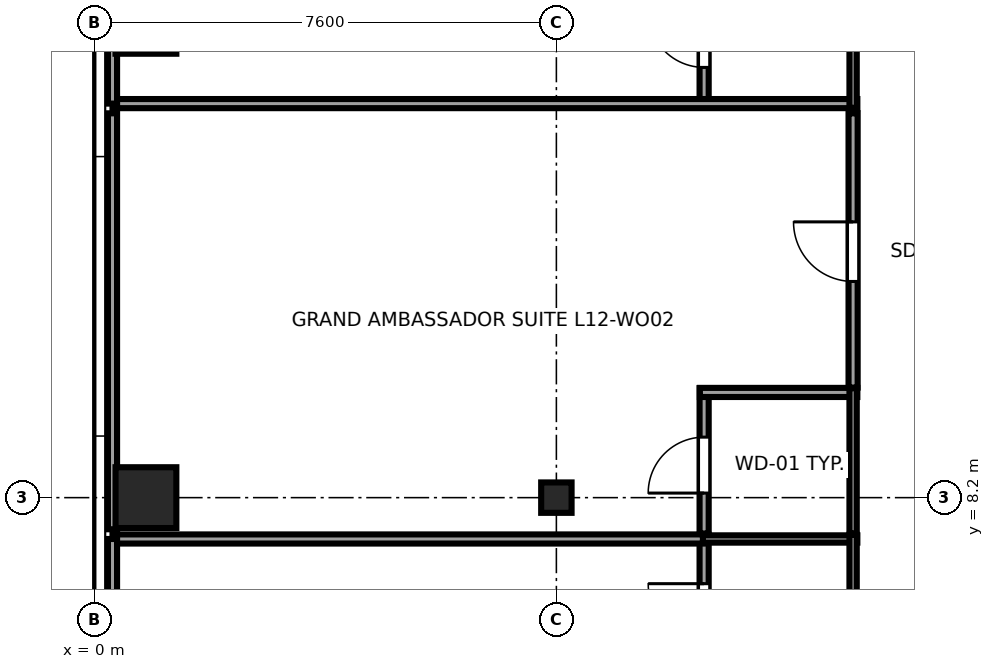
"""IFC4 building model, lengths in metres.
Left out: names, types, materials, properties, quantities, classifications, styles, units other than length and angle.
Written with IfcOpenShell. Run it as: python <this file> out.ifc"""

import sys

from ifc_helpers import new_model, si_unit, direction, frame, frame_2d, origin, origin_2d, place, context, subcontext, project, spatial, rectangle, i_section, extrude, source, transform, mapped, element, fill, save


model = new_model("IFC4")
c1 = context("Model", 3, precision=1e-05, world=origin(), true_north=direction((0.0, 1.0)))
c2 = subcontext(c1, "Body", "Model", "MODEL_VIEW")
j1 = project(units=[si_unit("LENGTHUNIT", "METRE"), si_unit("PLANEANGLEUNIT", "RADIAN")], contexts=[c1])
p1 = place(None, origin())
s1 = spatial("IfcSite", under=j1, at=p1, CompositionType="ELEMENT")
p2 = place(p1, origin())
s2 = spatial("IfcBuilding", under=s1, at=p2, CompositionType="ELEMENT")
p3 = place(p2, frame((0.0, 0.0, 53.3)))
s3 = spatial("IfcBuildingStorey", under=s2, at=p3, CompositionType="ELEMENT", Elevation=53.3)
m1 = source(origin(), c2, "Body", "SweptSolid", [
    extrude(rectangle(XDim=1.0, YDim=1.0, at=origin_2d()), origin(), (0.0, 0.0, 1.0), 3.55),
])
for number, where, z_axis, x_axis in (
    (1, (0.85, 8.2, 0.0), (0.0, 0.0, 1.0), (1.0, 0.0, 0.0)),
    (2, (0.85, 16.0, 0.0), (0.0, 0.0, 1.0), (1.0, 0.0, 0.0)),
):
    element("IfcColumn", number, at=place(p3, frame(where, z_axis=z_axis, x_axis=x_axis)), inside=s3, PredefinedType="COLUMN", context=c2, shape_type="MappedRepresentation", body=[
        mapped(m1, transform((0.0, 0.0, 0.0), x_axis=(1.0, 0.0, 0.0), y_axis=(0.0, 1.0, 0.0), z_axis=(0.0, 0.0, 1.0), scale=1.0)),
    ])
m2 = source(origin(), c2, "Body", "SweptSolid", [
    extrude(i_section(OverallWidth=0.5, OverallDepth=0.5, WebThickness=0.028, FlangeThickness=0.045, at=origin_2d()), origin(), (0.0, 0.0, 1.0), 3.55),
])
p4 = place(p3, frame((7.6, 8.2, 0.0), z_axis=(0.0, 0.0, 1.0), x_axis=(1.0, 0.0, 0.0)))
e3 = element("IfcColumn", 3, at=p4, inside=s3, PredefinedType="COLUMN", context=c2, shape_type="MappedRepresentation", body=[
    mapped(m2, transform((0.0, 0.0, 0.0), x_axis=(1.0, 0.0, 0.0), y_axis=(0.0, 1.0, 0.0), z_axis=(0.0, 0.0, 1.0), scale=1.0)),
])
p5 = place(p3, frame((10.03, 5.2, 0.0), z_axis=(0.0, 0.0, 1.0), x_axis=(0.0, 1.0, 0.0)))
e4 = element("IfcWall", 4, at=p5, inside=s3, PredefinedType="PARTITIONING", context=c2, shape_type="SweptSolid", body=[
    extrude(rectangle(XDim=2.39, YDim=0.15, at=frame_2d((1.195, 0.0))), origin(), (0.0, 0.0, 1.0), 3.37),
])
p6 = place(p5, frame((0.665, 0.0, 0.0)))
e5 = element("IfcOpeningElement", 5, at=p6, cuts=e4, PredefinedType="OPENING", context=c2, shape_type="SweptSolid", body=[
    extrude(rectangle(XDim=0.92, YDim=2.01, at=frame_2d((0.46, 1.005))), frame((0.0, 0.085, 0.0), z_axis=(0.0, -1.0, 0.0), x_axis=(1.0, 0.0, 0.0)), (0.0, 0.0, 1.0), 0.17),
])
p7 = place(p3, frame((9.96, 7.52, 0.0), z_axis=(0.0, 0.0, 1.0), x_axis=(1.0, 0.0, 0.0)))
e6 = element("IfcWall", 6, at=p7, inside=s3, PredefinedType="PLUMBINGWALL", context=c2, shape_type="SweptSolid", body=[
    extrude(rectangle(XDim=2.59, YDim=0.12, at=frame_2d((1.295, 0.0))), origin(), (0.0, 0.0, 1.0), 3.37),
])
p8 = place(p3, frame((12.48, 5.2, 0.0), z_axis=(0.0, 0.0, 1.0), x_axis=(0.0, 1.0, 0.0)))
e7 = element("IfcWall", 7, at=p8, inside=s3, PredefinedType="PLUMBINGWALL", context=c2, shape_type="SweptSolid", body=[
    extrude(rectangle(XDim=2.39, YDim=0.12, at=frame_2d((1.195, 0.0))), origin(), (0.0, 0.0, 1.0), 3.37),
])
p9 = place(p3, frame((10.03, 7.61, 0.0), z_axis=(0.0, 0.0, 1.0), x_axis=(0.0, 1.0, 0.0)))
e8 = element("IfcWall", 8, at=p9, inside=s3, PredefinedType="PARTITIONING", context=c2, shape_type="SweptSolid", body=[
    extrude(rectangle(XDim=2.39, YDim=0.15, at=frame_2d((1.195, 0.0))), origin(), (0.0, 0.0, 1.0), 3.37),
])
p10 = place(p9, frame((0.665, 0.0, 0.0)))
e9 = element("IfcOpeningElement", 9, at=p10, cuts=e8, PredefinedType="OPENING", context=c2, shape_type="SweptSolid", body=[
    extrude(rectangle(XDim=0.92, YDim=2.01, at=frame_2d((0.46, 1.005))), frame((0.0, 0.085, 0.0), z_axis=(0.0, -1.0, 0.0), x_axis=(1.0, 0.0, 0.0)), (0.0, 0.0, 1.0), 0.17),
])
p11 = place(p3, frame((9.96, 9.93, 0.0), z_axis=(0.0, 0.0, 1.0), x_axis=(1.0, 0.0, 0.0)))
e10 = element("IfcWall", 10, at=p11, inside=s3, PredefinedType="PARTITIONING", context=c2, shape_type="SweptSolid", body=[
    extrude(rectangle(XDim=2.59, YDim=0.15, at=frame_2d((1.295, 0.0))), origin(), (0.0, 0.0, 1.0), 3.37),
])
p12 = place(p3, frame((12.48, 7.61, 0.0), z_axis=(0.0, 0.0, 1.0), x_axis=(0.0, 1.0, 0.0)))
e11 = element("IfcWall", 11, at=p12, inside=s3, PredefinedType="PLUMBINGWALL", context=c2, shape_type="SweptSolid", body=[
    extrude(rectangle(XDim=2.39, YDim=0.12, at=frame_2d((1.195, 0.0))), origin(), (0.0, 0.0, 1.0), 3.37),
])
p13 = place(p3, frame((10.03, 14.61, 0.0), z_axis=(0.0, 0.0, 1.0), x_axis=(0.0, 1.0, 0.0)))
e12 = element("IfcWall", 12, at=p13, inside=s3, PredefinedType="PARTITIONING", context=c2, shape_type="SweptSolid", body=[
    extrude(rectangle(XDim=2.39, YDim=0.15, at=frame_2d((1.195, 0.0))), origin(), (0.0, 0.0, 1.0), 3.37),
])
p14 = place(p13, frame((0.665, 0.0, 0.0)))
e13 = element("IfcOpeningElement", 13, at=p14, cuts=e12, PredefinedType="OPENING", context=c2, shape_type="SweptSolid", body=[
    extrude(rectangle(XDim=0.92, YDim=2.01, at=frame_2d((0.46, 1.005))), frame((0.0, 0.085, 0.0), z_axis=(0.0, -1.0, 0.0), x_axis=(1.0, 0.0, 0.0)), (0.0, 0.0, 1.0), 0.17),
])
p15 = place(p3, frame((0.3, 14.68, 0.0), z_axis=(0.0, 0.0, 1.0), x_axis=(1.0, 0.0, 0.0)))
e14 = element("IfcWall", 14, at=p15, inside=s3, PredefinedType="PARTITIONING", context=c2, shape_type="SweptSolid", body=[
    extrude(rectangle(XDim=12.25, YDim=0.15, at=frame_2d((6.125, 0.0))), origin(), (0.0, 0.0, 1.0), 3.37),
])
p16 = place(p3, frame((12.48, 14.61, 0.0), z_axis=(0.0, 0.0, 1.0), x_axis=(0.0, 1.0, 0.0)))
e15 = element("IfcWall", 15, at=p16, inside=s3, PredefinedType="PLUMBINGWALL", context=c2, shape_type="SweptSolid", body=[
    extrude(rectangle(XDim=2.39, YDim=0.12, at=frame_2d((1.195, 0.0))), origin(), (0.0, 0.0, 1.0), 3.37),
])
p17 = place(p3, frame((0.3, 7.52, 0.0), z_axis=(0.0, 0.0, 1.0), x_axis=(1.0, 0.0, 0.0)))
e16 = element("IfcWall", 16, at=p17, inside=s3, PredefinedType="PARTITIONING", context=c2, shape_type="SweptSolid", body=[
    extrude(rectangle(XDim=9.71, YDim=0.15, at=frame_2d((4.855, 0.0))), origin(), (0.0, 0.0, 1.0), 3.37),
])
p18 = place(p3, frame((0.3, 4.642, 0.0), z_axis=(0.0, 0.0, 1.0), x_axis=(0.0, 1.0, 0.0)))
e17 = element("IfcWall", 17, at=p18, inside=s3, PredefinedType="PARTITIONING", context=c2, shape_type="SweptSolid", body=[
    extrude(rectangle(XDim=2.878, YDim=0.15, at=frame_2d((1.439, 0.0))), origin(), (0.0, 0.0, 1.0), 3.37),
])
p19 = place(p3, frame((12.48, 10.01, 0.0), z_axis=(0.0, 0.0, 1.0), x_axis=(0.0, 1.0, 0.0)))
e18 = element("IfcWall", 18, at=p19, inside=s3, PredefinedType="PARTITIONING", context=c2, shape_type="SweptSolid", body=[
    extrude(rectangle(XDim=4.51, YDim=0.15, at=frame_2d((2.255, 0.0))), origin(), (0.0, 0.0, 1.0), 3.37),
])
p20 = place(p19, frame((1.745, 0.0, 0.0)))
e19 = element("IfcOpeningElement", 19, at=p20, cuts=e18, PredefinedType="OPENING", context=c2, shape_type="SweptSolid", body=[
    extrude(rectangle(XDim=0.98, YDim=2.12, at=frame_2d((0.49, 1.06))), frame((0.0, 0.085, 0.0), z_axis=(0.0, -1.0, 0.0), x_axis=(1.0, 0.0, 0.0)), (0.0, 0.0, 1.0), 0.17),
])
p21 = place(p3, frame((0.3, 7.68, 0.0), z_axis=(0.0, 0.0, 1.0), x_axis=(0.0, 1.0, 0.0)))
e20 = element("IfcWall", 20, at=p21, inside=s3, PredefinedType="PARTITIONING", context=c2, shape_type="SweptSolid", body=[
    extrude(rectangle(XDim=6.84, YDim=0.15, at=frame_2d((3.42, 0.0))), origin(), (0.0, 0.0, 1.0), 3.37),
])
p22 = place(p3, frame((0.3, 14.68, 0.0), z_axis=(0.0, 0.0, 1.0), x_axis=(0.0, 1.0, 0.0)))
e21 = element("IfcWall", 21, at=p22, inside=s3, PredefinedType="PARTITIONING", context=c2, shape_type="SweptSolid", body=[
    extrude(rectangle(XDim=6.74, YDim=0.15, at=frame_2d((3.37, 0.0))), origin(), (0.0, 0.0, 1.0), 3.37),
])
m3 = source(origin(), c2, "Body", "SweptSolid", [
    extrude(rectangle(XDim=0.92, YDim=2.01, at=frame_2d((0.46, 1.005))), frame((0.0, 0.025, 0.0), z_axis=(0.0, -1.0, 0.0), x_axis=(1.0, 0.0, 0.0)), (0.0, 0.0, 1.0), 0.05),
])
p23 = place(p6, origin())
e22 = element("IfcDoor", 22, at=p23, inside=s3, OperationType="SINGLE_SWING_RIGHT", PredefinedType="DOOR", context=c2, shape_type="MappedRepresentation", body=[
    mapped(m3, transform((0.0, 0.0, 0.0), x_axis=(1.0, 0.0, 0.0), y_axis=(0.0, 1.0, 0.0), z_axis=(0.0, 0.0, 1.0), scale=1.0)),
])
fill(e5, e22)
p24 = place(p10, origin())
e23 = element("IfcDoor", 23, at=p24, inside=s3, OperationType="SINGLE_SWING_LEFT", PredefinedType="DOOR", context=c2, shape_type="MappedRepresentation", body=[
    mapped(m3, transform((0.0, 0.0, 0.0), x_axis=(1.0, 0.0, 0.0), y_axis=(0.0, 1.0, 0.0), z_axis=(0.0, 0.0, 1.0), scale=1.0)),
])
fill(e9, e23)
p25 = place(p14, origin())
e24 = element("IfcDoor", 24, at=p25, inside=s3, OperationType="SINGLE_SWING_RIGHT", PredefinedType="DOOR", context=c2, shape_type="MappedRepresentation", body=[
    mapped(m3, transform((0.0, 0.0, 0.0), x_axis=(1.0, 0.0, 0.0), y_axis=(0.0, 1.0, 0.0), z_axis=(0.0, 0.0, 1.0), scale=1.0)),
])
fill(e13, e24)
m4 = source(origin(), c2, "Body", "SweptSolid", [
    extrude(rectangle(XDim=0.98, YDim=2.12, at=frame_2d((0.49, 1.06))), frame((0.0, 0.025, 0.0), z_axis=(0.0, -1.0, 0.0), x_axis=(1.0, 0.0, 0.0)), (0.0, 0.0, 1.0), 0.05),
])
p26 = place(p20, origin())
e25 = element("IfcDoor", 25, at=p26, inside=s3, OperationType="SINGLE_SWING_RIGHT", PredefinedType="DOOR", context=c2, shape_type="MappedRepresentation", body=[
    mapped(m4, transform((0.0, 0.0, 0.0), x_axis=(1.0, 0.0, 0.0), y_axis=(0.0, 1.0, 0.0), z_axis=(0.0, 0.0, 1.0), scale=1.0)),
])
fill(e19, e25)
save(model, sys.argv[1])
